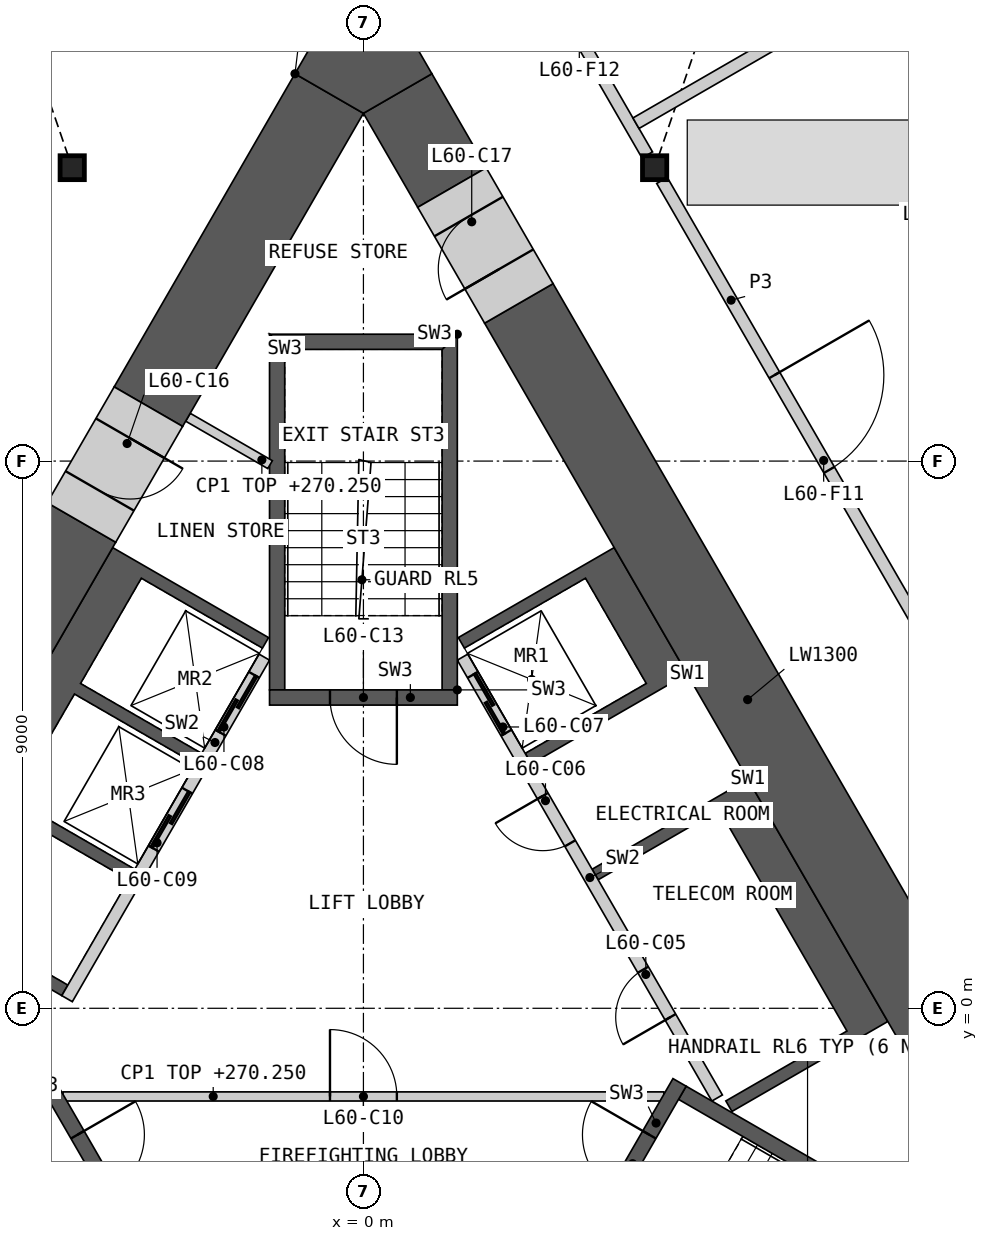
"""IFC4 building model, lengths in metres.
Left out: names, types, materials, properties, quantities, classifications, styles, units other than length and angle.
Written with IfcOpenShell. Run it as: python <this file> out.ifc"""

import sys

from ifc_helpers import new_model, si_unit, direction, frame, frame_2d, origin, origin_2d, place, context, subcontext, project, spatial, polyline, rectangle, i_section, outline, extrude, element, fill, save


model = new_model("IFC4")
c1 = context("Model", 3, precision=1e-05, world=origin(), true_north=direction((0.0, 1.0)))
c2 = subcontext(c1, "Body", "Model", "MODEL_VIEW")
j1 = project(units=[si_unit("LENGTHUNIT", "METRE"), si_unit("PLANEANGLEUNIT", "RADIAN")], contexts=[c1])
p1 = place(None, origin())
s1 = spatial("IfcSite", under=j1, at=p1, CompositionType="ELEMENT")
p2 = place(p1, origin())
s2 = spatial("IfcBuilding", under=s1, at=p2, CompositionType="ELEMENT")
p3 = place(p2, frame((0.0, 0.0, 267.0)))
s3 = spatial("IfcBuildingStorey", under=s2, at=p3, CompositionType="ELEMENT", Elevation=267.0)
for number, where, z_axis, x_axis in (
    (1, (-4.789, 13.825, 0.0), (0.0, 0.0, 1.0), (1.0, 0.0, 0.0)),
    (2, (4.789, 13.825, 0.0), (0.0, 0.0, 1.0), (1.0, 0.0, 0.0)),
):
    element("IfcColumn", number, at=place(p3, frame(where, z_axis=z_axis, x_axis=x_axis)), inside=s3, PredefinedType="COLUMN", context=c2, shape_type="SweptSolid", body=[
        extrude(i_section(OverallWidth=0.399, OverallDepth=0.393, WebThickness=0.023, FlangeThickness=0.037, at=origin_2d()), origin(), (0.0, 0.0, 1.0), 3.6),
    ])
p4 = place(p3, origin())
e3 = element("IfcWall", 3, at=p4, inside=s3, PredefinedType="SHEAR", context=c2, shape_type="SweptSolid", body=[
    extrude(outline(polyline([(6.324, 3.767), (8.624, -0.217), (8.231, -0.444), (6.061, -1.697), (5.96, -1.524), (7.952, -0.374), (5.852, 3.263), (3.861, 2.113), (3.76, 2.287), (5.931, 3.54), (6.324, 3.767)])), origin(), (0.0, 0.0, 1.0), 3.25),
])
p5 = place(p3, origin())
e4 = element("IfcWall", 4, at=p5, inside=s3, PredefinedType="SHEAR", context=c2, shape_type="SweptSolid", body=[
    extrude(outline(polyline([(5.324, 5.499), (4.931, 5.272), (2.76, 4.019), (2.66, 4.192), (4.652, 5.342), (3.652, 7.074), (1.66, 5.924), (1.561, 6.097), (3.731, 7.35), (4.124, 7.577), (5.324, 5.499)])), origin(), (0.0, 0.0, 1.0), 3.25),
])
p6 = place(p3, frame((5.817, -1.476, 0.0), z_axis=(0.0, 0.0, 1.0), x_axis=(-0.500002616675, 0.866023893041, 0.0)))
e5 = element("IfcWall", 5, at=p6, inside=s3, PredefinedType="SOLIDWALL", context=c2, shape_type="SweptSolid", body=[
    extrude(rectangle(XDim=8.373, YDim=0.2, at=frame_2d((4.187, 0.0))), origin(), (0.0, 0.0, 1.0), 3.25),
])
p7 = place(p6, frame((1.537, 0.0, 0.0)))
e6 = element("IfcOpeningElement", 6, at=p7, cuts=e5, PredefinedType="OPENING", context=c2, shape_type="SweptSolid", body=[
    extrude(rectangle(XDim=0.9, YDim=2.1, at=frame_2d((0.45, 1.05))), frame((0.0, 0.11, 0.0), z_axis=(0.0, -1.0, 0.0), x_axis=(1.0, 0.0, 0.0)), (0.0, 0.0, 1.0), 0.22),
])
p8 = place(p6, frame((4.837, 0.0, 0.0)))
e7 = element("IfcOpeningElement", 7, at=p8, cuts=e5, PredefinedType="OPENING", context=c2, shape_type="SweptSolid", body=[
    extrude(rectangle(XDim=0.9, YDim=2.1, at=frame_2d((0.45, 1.05))), frame((0.0, 0.11, 0.0), z_axis=(0.0, -1.0, 0.0), x_axis=(1.0, 0.0, 0.0)), (0.0, 0.0, 1.0), 0.22),
])
p9 = place(p6, frame((6.937, 0.0, 0.0)))
e8 = element("IfcOpeningElement", 8, at=p9, cuts=e5, PredefinedType="OPENING", context=c2, shape_type="SweptSolid", body=[
    extrude(rectangle(XDim=1.1, YDim=2.1, at=frame_2d((0.55, 1.05))), frame((0.0, 0.11, 0.0), z_axis=(0.0, -1.0, 0.0), x_axis=(1.0, 0.0, 0.0)), (0.0, 0.0, 1.0), 0.22),
])
p10 = place(p3, origin())
e9 = element("IfcWall", 9, at=p10, inside=s3, PredefinedType="SHEAR", context=c2, shape_type="SweptSolid", body=[
    extrude(outline(polyline([(-7.524, 1.688), (-4.124, 7.577), (-3.731, 7.35), (-1.561, 6.097), (-1.66, 5.924), (-3.652, 7.074), (-4.652, 5.342), (-2.66, 4.192), (-2.76, 4.019), (-4.752, 5.169), (-5.752, 3.437), (-3.76, 2.287), (-3.861, 2.113), (-5.852, 3.263), (-6.852, 1.531), (-4.861, 0.381), (-4.96, 0.208), (-7.131, 1.461), (-7.524, 1.688)])), origin(), (0.0, 0.0, 1.0), 3.25),
])
p11 = place(p3, frame((-1.631, 5.776, 0.0), z_axis=(0.0, 0.0, 1.0), x_axis=(-0.499992876559, -0.866029516466, 0.0)))
e10 = element("IfcWall", 10, at=p11, inside=s3, PredefinedType="SOLIDWALL", context=c2, shape_type="SweptSolid", body=[
    extrude(rectangle(XDim=6.486, YDim=0.2, at=frame_2d((3.243, 0.0))), origin(), (0.0, 0.0, 1.0), 3.25),
])
p12 = place(p11, frame((0.337, 0.0, 0.0)))
e11 = element("IfcOpeningElement", 11, at=p12, cuts=e10, PredefinedType="OPENING", context=c2, shape_type="SweptSolid", body=[
    extrude(rectangle(XDim=1.1, YDim=2.1, at=frame_2d((0.55, 1.05))), frame((0.0, 0.11, 0.0), z_axis=(0.0, -1.0, 0.0), x_axis=(1.0, 0.0, 0.0)), (0.0, 0.0, 1.0), 0.22),
])
p13 = place(p11, frame((2.537, 0.0, 0.0)))
e12 = element("IfcOpeningElement", 12, at=p13, cuts=e10, PredefinedType="OPENING", context=c2, shape_type="SweptSolid", body=[
    extrude(rectangle(XDim=1.1, YDim=2.1, at=frame_2d((0.55, 1.05))), frame((0.0, 0.11, 0.0), z_axis=(0.0, -1.0, 0.0), x_axis=(1.0, 0.0, 0.0)), (0.0, 0.0, 1.0), 0.22),
])
p14 = place(p3, frame((-4.941, -1.45, 0.0), z_axis=(0.0, 0.0, 1.0), x_axis=(1.0, 0.0, 0.0)))
e13 = element("IfcWall", 13, at=p14, inside=s3, PredefinedType="PARTITIONING", context=c2, shape_type="SweptSolid", body=[
    extrude(rectangle(XDim=9.882, YDim=0.15, at=frame_2d((4.941, 0.0))), origin(), (0.0, 0.0, 1.0), 3.25),
])
p15 = place(p14, frame((4.391, 0.0, 0.0)))
e14 = element("IfcOpeningElement", 14, at=p15, cuts=e13, PredefinedType="OPENING", context=c2, shape_type="SweptSolid", body=[
    extrude(rectangle(XDim=1.1, YDim=2.1, at=frame_2d((0.55, 1.05))), frame((0.0, 0.085, 0.0), z_axis=(0.0, -1.0, 0.0), x_axis=(1.0, 0.0, 0.0)), (0.0, 0.0, 1.0), 0.17),
])
p16 = place(p3, frame((-5.199, -1.219, 0.0), z_axis=(0.0, 0.0, 1.0), x_axis=(0.499982516597, -0.866035497597, 0.0)))
e15 = element("IfcWall", 15, at=p16, inside=s3, PredefinedType="SHEAR", context=c2, shape_type="SweptSolid", body=[
    extrude(rectangle(XDim=3.088, YDim=0.25, at=frame_2d((1.544, 0.0))), origin(), (0.0, 0.0, 1.0), 3.25),
])
p17 = place(p16, frame((0.994, 0.0, 0.0)))
e16 = element("IfcOpeningElement", 16, at=p17, cuts=e15, PredefinedType="OPENING", context=c2, shape_type="SweptSolid", body=[
    extrude(rectangle(XDim=1.1, YDim=2.1, at=frame_2d((0.55, 1.05))), frame((0.0, 0.135, 0.0), z_axis=(0.0, -1.0, 0.0), x_axis=(1.0, 0.0, 0.0)), (0.0, 0.0, 1.0), 0.27),
])
p18 = place(p3, origin())
e17 = element("IfcWall", 17, at=p18, inside=s3, PredefinedType="SHEAR", context=c2, shape_type="SweptSolid", body=[
    extrude(outline(polyline([(10.032, -4.298), (10.374, -4.206), (5.307, -1.281), (5.182, -1.498), (10.032, -4.298)])), origin(), (0.0, 0.0, 1.0), 3.25),
])
p19 = place(p3, frame((3.655, -3.893, 0.0), z_axis=(0.0, 0.0, 1.0), x_axis=(0.499982516597, 0.866035497597, 0.0)))
e18 = element("IfcWall", 18, at=p19, inside=s3, PredefinedType="SHEAR", context=c2, shape_type="SweptSolid", body=[
    extrude(rectangle(XDim=3.088, YDim=0.25, at=frame_2d((1.544, 0.0))), origin(), (0.0, 0.0, 1.0), 3.25),
])
p20 = place(p19, frame((0.994, 0.0, 0.0)))
e19 = element("IfcOpeningElement", 19, at=p20, cuts=e18, PredefinedType="OPENING", context=c2, shape_type="SweptSolid", body=[
    extrude(rectangle(XDim=1.1, YDim=2.1, at=frame_2d((0.55, 1.05))), frame((0.0, 0.135, 0.0), z_axis=(0.0, -1.0, 0.0), x_axis=(1.0, 0.0, 0.0)), (0.0, 0.0, 1.0), 0.27),
])
p21 = place(p3, origin())
e20 = element("IfcWall", 20, at=p21, inside=s3, PredefinedType="SHEAR", context=c2, shape_type="SweptSolid", body=[
    extrude(outline(polyline([(1.544, 5.237), (1.544, 11.087), (1.294, 10.837), (1.294, 5.237), (1.544, 5.237)])), origin(), (0.0, 0.0, 1.0), 3.25),
])
p22 = place(p3, origin())
e21 = element("IfcWall", 21, at=p22, inside=s3, PredefinedType="SHEAR", context=c2, shape_type="SweptSolid", body=[
    extrude(outline(polyline([(1.544, 11.087), (-1.544, 11.087), (-1.294, 10.837), (1.294, 10.837), (1.544, 11.087)])), origin(), (0.0, 0.0, 1.0), 3.25),
])
p23 = place(p3, origin())
e22 = element("IfcWall", 22, at=p23, inside=s3, PredefinedType="SHEAR", context=c2, shape_type="SweptSolid", body=[
    extrude(outline(polyline([(-1.294, 10.837), (-1.544, 11.087), (-1.544, 5.237), (-1.294, 5.237), (-1.294, 10.837)])), origin(), (0.0, 0.0, 1.0), 3.25),
])
p24 = place(p3, frame((1.544, 5.112, 0.0), z_axis=(0.0, 0.0, 1.0), x_axis=(-1.0, 0.0, 0.0)))
e23 = element("IfcWall", 23, at=p24, inside=s3, PredefinedType="SHEAR", context=c2, shape_type="SweptSolid", body=[
    extrude(rectangle(XDim=3.088, YDim=0.25, at=frame_2d((1.544, 0.0))), origin(), (0.0, 0.0, 1.0), 3.25),
])
p25 = place(p24, frame((0.994, 0.0, 0.0)))
e24 = element("IfcOpeningElement", 24, at=p25, cuts=e23, PredefinedType="OPENING", context=c2, shape_type="SweptSolid", body=[
    extrude(rectangle(XDim=1.1, YDim=2.1, at=frame_2d((0.55, 1.05))), frame((0.0, 0.135, 0.0), z_axis=(0.0, -1.0, 0.0), x_axis=(1.0, 0.0, 0.0)), (0.0, 0.0, 1.0), 0.27),
])
p26 = place(p3, frame((-2.886, 9.721, 0.0), z_axis=(0.0, 0.0, 1.0), x_axis=(0.865990094875, -0.500061151839, 0.0)))
e25 = element("IfcWall", 25, at=p26, inside=s3, PredefinedType="PARTITIONING", context=c2, shape_type="SweptSolid", body=[
    extrude(rectangle(XDim=1.56, YDim=0.15, at=frame_2d((0.78, 0.0))), origin(), (0.0, 0.0, 1.0), 3.25),
])
p27 = place(p3, frame((10.081, -1.441, 0.0), z_axis=(0.0, 0.0, 1.0), x_axis=(-0.500012180433, 0.866018371294, 0.0)))
e26 = element("IfcWall", 26, at=p27, inside=s3, PredefinedType="SHEAR", context=c2, shape_type="SweptSolid", body=[
    extrude(rectangle(XDim=15.05, YDim=1.3, at=frame_2d((7.525, 0.0))), origin(), (0.0, 0.0, 1.0), 3.25),
])
p28 = place(p3, frame((1.456, 13.499, 0.0), z_axis=(0.0, 0.0, 1.0), x_axis=(-0.499990639951, 0.866030807744, 0.0)))
e27 = element("IfcWall", 27, at=p28, inside=s3, PredefinedType="SHEAR", context=c2, shape_type="SweptSolid", body=[
    extrude(rectangle(XDim=1.786, YDim=1.3, at=frame_2d((0.893, 0.0))), origin(), (0.0, 0.0, 1.0), 3.25),
])
p29 = place(p3, frame((-4.636, 7.99, 0.0), z_axis=(0.0, 0.0, 1.0), x_axis=(-0.500022813292, -0.866012232124, 0.0)))
e28 = element("IfcWall", 28, at=p29, inside=s3, PredefinedType="SHEAR", context=c2, shape_type="SweptSolid", body=[
    extrude(rectangle(XDim=6.802, YDim=1.3, at=frame_2d((3.401, 0.0))), origin(), (0.0, 0.0, 1.0), 3.25),
])
p30 = place(p3, frame((-0.563, 15.045, 0.0), z_axis=(0.0, 0.0, 1.0), x_axis=(-0.500011498138, -0.866018765229, 0.0)))
e29 = element("IfcWall", 29, at=p30, inside=s3, PredefinedType="SHEAR", context=c2, shape_type="SweptSolid", body=[
    extrude(rectangle(XDim=5.947, YDim=1.3, at=frame_2d((2.973, 0.0))), origin(), (0.0, 0.0, 1.0), 3.25),
])
p31 = place(p3, origin())
e30 = element("IfcWall", 30, at=p31, inside=s3, PredefinedType="SHEAR", context=c2, shape_type="SweptSolid", body=[
    extrude(outline(polyline([(-1.126, 15.371), (0.0, 17.321), (1.126, 15.371), (0.0, 14.72), (-1.126, 15.371)])), origin(), (0.0, 0.0, 1.0), 3.25),
])
p32 = place(p3, frame((-3.536, 9.896, 0.0), z_axis=(0.0, 0.0, 1.0), x_axis=(-0.499981787252, -0.866035918664, 0.0)))
e31 = element("IfcWall", 31, at=p32, inside=s3, PredefinedType="SHEAR", context=c2, shape_type="SweptSolid", body=[
    extrude(rectangle(XDim=2.2, YDim=1.3, at=frame_2d((1.1, 0.0))), origin(), (0.0, 0.0, 1.0), 3.25),
])
p33 = place(p32, frame((0.6, 0.0, 0.0)))
e32 = element("IfcOpeningElement", 32, at=p33, cuts=e31, PredefinedType="OPENING", context=c2, shape_type="SweptSolid", body=[
    extrude(rectangle(XDim=1.0, YDim=2.1, at=frame_2d((0.5, 1.05))), frame((0.0, 0.66, 0.0), z_axis=(0.0, -1.0, 0.0), x_axis=(1.0, 0.0, 0.0)), (0.0, 0.0, 1.0), 1.32),
])
p34 = place(p3, frame((2.556, 11.593, 0.0), z_axis=(0.0, 0.0, 1.0), x_axis=(-0.499946605688, 0.86605622881, 0.0)))
e33 = element("IfcWall", 33, at=p34, inside=s3, PredefinedType="SHEAR", context=c2, shape_type="SweptSolid", body=[
    extrude(rectangle(XDim=2.2, YDim=1.3, at=frame_2d((1.1, 0.0))), origin(), (0.0, 0.0, 1.0), 3.25),
])
p35 = place(p34, frame((0.65, 0.0, 0.0)))
e34 = element("IfcOpeningElement", 34, at=p35, cuts=e33, PredefinedType="OPENING", context=c2, shape_type="SweptSolid", body=[
    extrude(rectangle(XDim=1.0, YDim=2.1, at=frame_2d((0.5, 1.05))), frame((0.0, 0.66, 0.0), z_axis=(0.0, -1.0, 0.0), x_axis=(1.0, 0.0, 0.0)), (0.0, 0.0, 1.0), 1.32),
])
p36 = place(p3, frame((4.91, 13.616, 0.0), z_axis=(0.0, 0.0, 1.0), x_axis=(0.50000207303, -0.866024206917, 0.0)))
e35 = element("IfcWall", 35, at=p36, inside=s3, PredefinedType="PARTITIONING", context=c2, shape_type="SweptSolid", body=[
    extrude(rectangle(XDim=9.095, YDim=0.2, at=frame_2d((4.547, 0.0))), origin(), (0.0, 0.0, 1.0), 3.25),
])
p37 = place(p36, frame((3.698, 0.0, 0.0)))
e36 = element("IfcOpeningElement", 36, at=p37, cuts=e35, PredefinedType="OPENING", context=c2, shape_type="SweptSolid", body=[
    extrude(rectangle(XDim=1.8, YDim=2.1, at=frame_2d((0.9, 1.05))), frame((0.0, 0.11, 0.0), z_axis=(0.0, -1.0, 0.0), x_axis=(1.0, 0.0, 0.0)), (0.0, 0.0, 1.0), 0.22),
])
p38 = place(p3, frame((1.913, 18.807, 0.0), z_axis=(0.0, 0.0, 1.0), x_axis=(0.499984524817, -0.866034338201, 0.0)))
e37 = element("IfcWall", 37, at=p38, inside=s3, PredefinedType="PARTITIONING", context=c2, shape_type="SweptSolid", body=[
    extrude(rectangle(XDim=5.51, YDim=0.2, at=frame_2d((2.755, 0.0))), origin(), (0.0, 0.0, 1.0), 3.25),
])
p39 = place(p38, frame((1.655, 0.0, 0.0)))
e38 = element("IfcOpeningElement", 38, at=p39, cuts=e37, PredefinedType="OPENING", context=c2, shape_type="SweptSolid", body=[
    extrude(rectangle(XDim=1.8, YDim=2.1, at=frame_2d((0.9, 1.05))), frame((0.0, 0.11, 0.0), z_axis=(0.0, -1.0, 0.0), x_axis=(1.0, 0.0, 0.0)), (0.0, 0.0, 1.0), 0.22),
])
p40 = place(p3, frame((4.482, 14.557, 0.0), z_axis=(0.0, 0.0, 1.0), x_axis=(0.866030620616, 0.499990964073, 0.0)))
e39 = element("IfcWall", 39, at=p40, inside=s3, PredefinedType="PARTITIONING", context=c2, shape_type="SweptSolid", body=[
    extrude(rectangle(XDim=12.304, YDim=0.2, at=frame_2d((6.152, 0.0))), origin(), (0.0, 0.0, 1.0), 2.404),
])
p41 = place(p7, origin())
e40 = element("IfcDoor", 40, at=p41, inside=s3, OperationType="SINGLE_SWING_LEFT", PredefinedType="DOOR", context=c2, shape_type="SweptSolid", body=[
    extrude(rectangle(XDim=0.9, YDim=2.1, at=frame_2d((0.45, 1.05))), frame((0.0, 0.025, 0.0), z_axis=(0.0, -1.0, 0.0), x_axis=(1.0, 0.0, 0.0)), (0.0, 0.0, 1.0), 0.05),
])
fill(e6, e40)
p42 = place(p8, origin())
e41 = element("IfcDoor", 41, at=p42, inside=s3, OperationType="SINGLE_SWING_RIGHT", PredefinedType="DOOR", context=c2, shape_type="SweptSolid", body=[
    extrude(rectangle(XDim=0.9, YDim=2.1, at=frame_2d((0.45, 1.05))), frame((0.0, 0.025, 0.0), z_axis=(0.0, -1.0, 0.0), x_axis=(1.0, 0.0, 0.0)), (0.0, 0.0, 1.0), 0.05),
])
fill(e7, e41)
p43 = place(p9, origin())
e42 = element("IfcDoor", 42, at=p43, inside=s3, OperationType="SLIDING_TO_LEFT", PredefinedType="DOOR", context=c2, shape_type="SweptSolid", body=[
    extrude(rectangle(XDim=1.1, YDim=2.1, at=frame_2d((0.55, 1.05))), frame((0.0, 0.025, 0.0), z_axis=(0.0, -1.0, 0.0), x_axis=(1.0, 0.0, 0.0)), (0.0, 0.0, 1.0), 0.05),
])
fill(e8, e42)
p44 = place(p12, origin())
e43 = element("IfcDoor", 43, at=p44, inside=s3, OperationType="SLIDING_TO_LEFT", PredefinedType="DOOR", context=c2, shape_type="SweptSolid", body=[
    extrude(rectangle(XDim=1.1, YDim=2.1, at=frame_2d((0.55, 1.05))), frame((0.0, 0.025, 0.0), z_axis=(0.0, -1.0, 0.0), x_axis=(1.0, 0.0, 0.0)), (0.0, 0.0, 1.0), 0.05),
])
fill(e11, e43)
p45 = place(p13, origin())
e44 = element("IfcDoor", 44, at=p45, inside=s3, OperationType="SLIDING_TO_LEFT", PredefinedType="DOOR", context=c2, shape_type="SweptSolid", body=[
    extrude(rectangle(XDim=1.1, YDim=2.1, at=frame_2d((0.55, 1.05))), frame((0.0, 0.025, 0.0), z_axis=(0.0, -1.0, 0.0), x_axis=(1.0, 0.0, 0.0)), (0.0, 0.0, 1.0), 0.05),
])
fill(e12, e44)
p46 = place(p15, origin())
e45 = element("IfcDoor", 45, at=p46, inside=s3, OperationType="SINGLE_SWING_LEFT", PredefinedType="DOOR", context=c2, shape_type="SweptSolid", body=[
    extrude(rectangle(XDim=1.1, YDim=2.1, at=frame_2d((0.55, 1.05))), frame((0.0, 0.025, 0.0), z_axis=(0.0, -1.0, 0.0), x_axis=(1.0, 0.0, 0.0)), (0.0, 0.0, 1.0), 0.05),
])
fill(e14, e45)
p47 = place(p17, origin())
e46 = element("IfcDoor", 46, at=p47, inside=s3, OperationType="SINGLE_SWING_LEFT", PredefinedType="DOOR", context=c2, shape_type="SweptSolid", body=[
    extrude(rectangle(XDim=1.1, YDim=2.1, at=frame_2d((0.55, 1.05))), frame((0.0, 0.025, 0.0), z_axis=(0.0, -1.0, 0.0), x_axis=(1.0, 0.0, 0.0)), (0.0, 0.0, 1.0), 0.05),
])
fill(e16, e46)
p48 = place(p20, origin())
e47 = element("IfcDoor", 47, at=p48, inside=s3, OperationType="SINGLE_SWING_RIGHT", PredefinedType="DOOR", context=c2, shape_type="SweptSolid", body=[
    extrude(rectangle(XDim=1.1, YDim=2.1, at=frame_2d((0.55, 1.05))), frame((0.0, 0.025, 0.0), z_axis=(0.0, -1.0, 0.0), x_axis=(1.0, 0.0, 0.0)), (0.0, 0.0, 1.0), 0.05),
])
fill(e19, e47)
p49 = place(p25, origin())
e48 = element("IfcDoor", 48, at=p49, inside=s3, OperationType="SINGLE_SWING_LEFT", PredefinedType="DOOR", context=c2, shape_type="SweptSolid", body=[
    extrude(rectangle(XDim=1.1, YDim=2.1, at=frame_2d((0.55, 1.05))), frame((0.0, 0.025, 0.0), z_axis=(0.0, -1.0, 0.0), x_axis=(1.0, 0.0, 0.0)), (0.0, 0.0, 1.0), 0.05),
])
fill(e24, e48)
p50 = place(p33, origin())
e49 = element("IfcDoor", 49, at=p50, inside=s3, OperationType="SINGLE_SWING_LEFT", PredefinedType="DOOR", context=c2, shape_type="SweptSolid", body=[
    extrude(rectangle(XDim=1.0, YDim=2.1, at=frame_2d((0.5, 1.05))), frame((0.0, 0.405, 0.0), z_axis=(0.0, -1.0, 0.0), x_axis=(1.0, 0.0, 0.0)), (0.0, 0.0, 1.0), 0.05),
])
fill(e32, e49)
p51 = place(p35, origin())
e50 = element("IfcDoor", 50, at=p51, inside=s3, OperationType="SINGLE_SWING_LEFT", PredefinedType="DOOR", context=c2, shape_type="SweptSolid", body=[
    extrude(rectangle(XDim=1.0, YDim=2.1, at=frame_2d((0.5, 1.05))), frame((0.0, 0.405, 0.0), z_axis=(0.0, -1.0, 0.0), x_axis=(1.0, 0.0, 0.0)), (0.0, 0.0, 1.0), 0.05),
])
fill(e34, e50)
p52 = place(p37, origin())
e51 = element("IfcDoor", 51, at=p52, inside=s3, OperationType="DOUBLE_DOOR_SINGLE_SWING", PredefinedType="DOOR", context=c2, shape_type="SweptSolid", body=[
    extrude(rectangle(XDim=1.8, YDim=2.1, at=frame_2d((0.9, 1.05))), frame((0.0, 0.025, 0.0), z_axis=(0.0, -1.0, 0.0), x_axis=(1.0, 0.0, 0.0)), (0.0, 0.0, 1.0), 0.05),
])
fill(e36, e51)
save(model, sys.argv[1])
